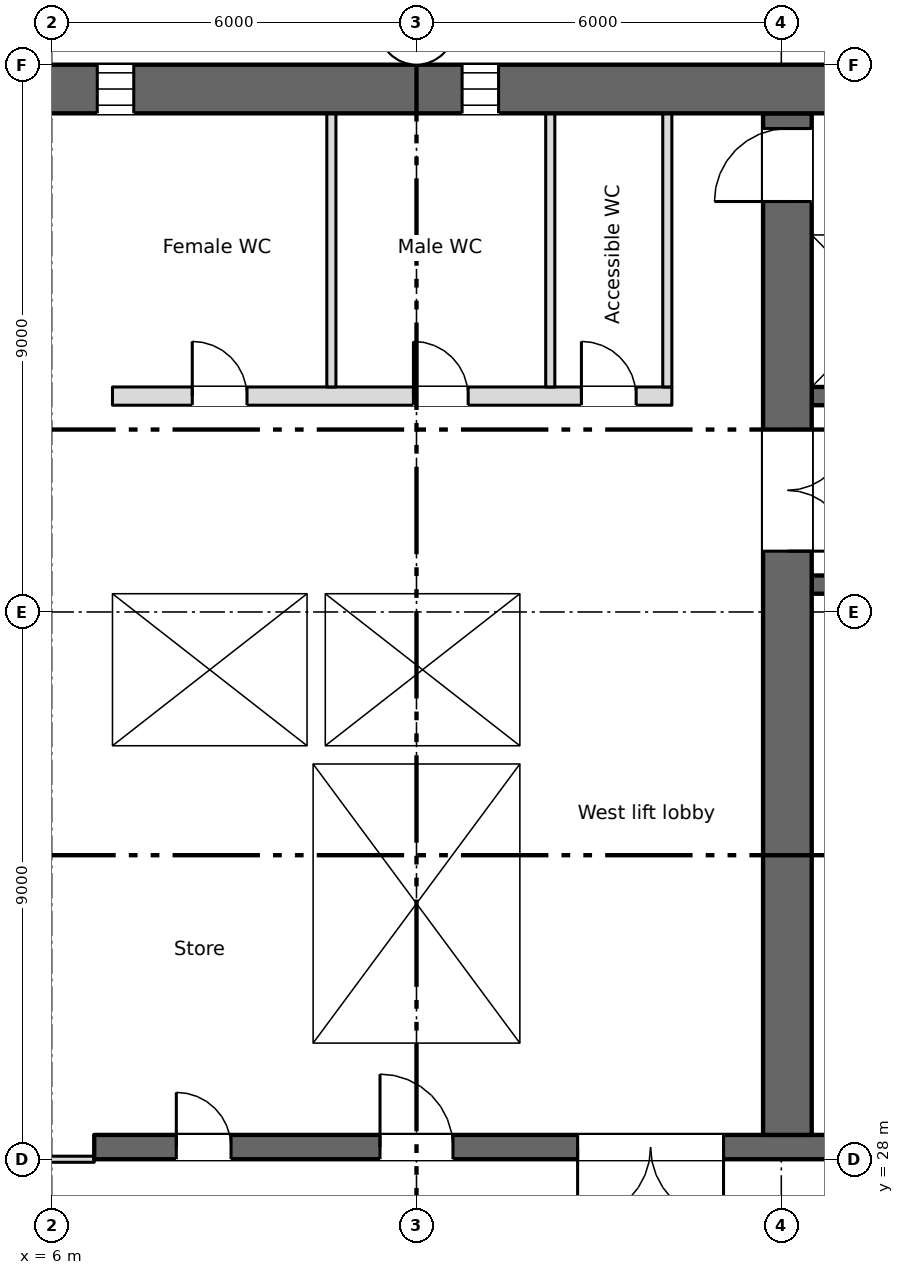
"""IFC4 building model, lengths in metres.
Left out: names, types, materials, properties, quantities, classifications, styles, units other than length and angle.
Written with IfcOpenShell. Run it as: python <this file> out.ifc"""

import sys

from ifc_helpers import new_model, si_unit, direction, frame, frame_2d, origin, place, context, subcontext, project, spatial, rectangle, extrude, element, fill, save


model = new_model("IFC4")
c1 = context("Model", 3, precision=1e-05, world=origin(), true_north=direction((0.0, 1.0)))
c2 = subcontext(c1, "Body", "Model", "MODEL_VIEW")
j1 = project(units=[si_unit("LENGTHUNIT", "METRE"), si_unit("PLANEANGLEUNIT", "RADIAN")], contexts=[c1])
p1 = place(None, origin())
s1 = spatial("IfcSite", under=j1, at=p1, CompositionType="ELEMENT")
p2 = place(p1, origin())
s2 = spatial("IfcBuilding", under=s1, at=p2, CompositionType="ELEMENT")
p3 = place(p2, frame((0.0, 0.0, 98.75)))
s3 = spatial("IfcBuildingStorey", under=s2, at=p3, CompositionType="ELEMENT", Elevation=98.75)
p4 = place(p3, frame((5.55, 45.6, 0.0), z_axis=(0.0, 0.0, 1.0), x_axis=(1.0, 0.0, 0.0)))
e1 = element("IfcWall", 1, at=p4, inside=s3, PredefinedType="SHEAR", context=c2, shape_type="SweptSolid", body=[
    extrude(rectangle(XDim=60.9, YDim=0.8, at=frame_2d((30.45, 0.0))), origin(), (0.0, 0.0, 1.0), 3.35),
])
p5 = place(p4, frame((1.2, 0.0, 0.6)))
e2 = element("IfcOpeningElement", 2, at=p5, cuts=e1, PredefinedType="OPENING", context=c2, shape_type="SweptSolid", body=[
    extrude(rectangle(XDim=0.6, YDim=2.4, at=frame_2d((0.3, 1.2))), frame((0.0, 0.41, 0.0), z_axis=(0.0, -1.0, 0.0), x_axis=(1.0, 0.0, 0.0)), (0.0, 0.0, 1.0), 0.82),
])
p6 = place(p4, frame((7.2, 0.0, 0.6)))
e3 = element("IfcOpeningElement", 3, at=p6, cuts=e1, PredefinedType="OPENING", context=c2, shape_type="SweptSolid", body=[
    extrude(rectangle(XDim=0.6, YDim=2.4, at=frame_2d((0.3, 1.2))), frame((0.0, 0.41, 0.0), z_axis=(0.0, -1.0, 0.0), x_axis=(1.0, 0.0, 0.0)), (0.0, 0.0, 1.0), 0.82),
])
p7 = place(p3, frame((6.7, 28.2, 0.0), z_axis=(0.0, 0.0, 1.0), x_axis=(1.0, 0.0, 0.0)))
e4 = element("IfcWall", 4, at=p7, inside=s3, PredefinedType="SHEAR", context=c2, shape_type="SweptSolid", body=[
    extrude(rectangle(XDim=57.8, YDim=0.4, at=frame_2d((28.9, 0.0))), origin(), (0.0, 0.0, 1.0), 3.35),
])
p8 = place(p7, frame((13.85, 0.0, 0.0)))
e5 = element("IfcOpeningElement", 5, at=p8, cuts=e4, PredefinedType="OPENING", context=c2, shape_type="SweptSolid", body=[
    extrude(rectangle(XDim=0.9, YDim=2.1, at=frame_2d((0.45, 1.05))), frame((0.0, 0.21, 0.0), z_axis=(0.0, -1.0, 0.0), x_axis=(1.0, 0.0, 0.0)), (0.0, 0.0, 1.0), 0.42),
])
p9 = place(p7, frame((48.562, 0.0, 0.0)))
e6 = element("IfcOpeningElement", 6, at=p9, cuts=e4, PredefinedType="OPENING", context=c2, shape_type="SweptSolid", body=[
    extrude(rectangle(XDim=0.9, YDim=2.1, at=frame_2d((0.45, 1.05))), frame((0.0, 0.21, 0.0), z_axis=(0.0, -1.0, 0.0), x_axis=(1.0, 0.0, 0.0)), (0.0, 0.0, 1.0), 0.42),
])
p10 = place(p7, frame((51.137, 0.0, 0.0)))
e7 = element("IfcOpeningElement", 7, at=p10, cuts=e4, PredefinedType="OPENING", context=c2, shape_type="SweptSolid", body=[
    extrude(rectangle(XDim=0.9, YDim=2.1, at=frame_2d((0.45, 1.05))), frame((0.0, 0.21, 0.0), z_axis=(0.0, -1.0, 0.0), x_axis=(1.0, 0.0, 0.0)), (0.0, 0.0, 1.0), 0.42),
])
p11 = place(p7, frame((1.35, 0.0, 0.0)))
e8 = element("IfcOpeningElement", 8, at=p11, cuts=e4, PredefinedType="OPENING", context=c2, shape_type="SweptSolid", body=[
    extrude(rectangle(XDim=0.9, YDim=2.1, at=frame_2d((0.45, 1.05))), frame((0.0, 0.21, 0.0), z_axis=(0.0, -1.0, 0.0), x_axis=(1.0, 0.0, 0.0)), (0.0, 0.0, 1.0), 0.42),
])
p12 = place(p7, frame((4.7, 0.0, 0.0)))
e9 = element("IfcOpeningElement", 9, at=p12, cuts=e4, PredefinedType="OPENING", context=c2, shape_type="SweptSolid", body=[
    extrude(rectangle(XDim=1.2, YDim=2.1, at=frame_2d((0.6, 1.05))), frame((0.0, 0.21, 0.0), z_axis=(0.0, -1.0, 0.0), x_axis=(1.0, 0.0, 0.0)), (0.0, 0.0, 1.0), 0.42),
])
p13 = place(p7, frame((31.7, 0.0, 0.0)))
e10 = element("IfcOpeningElement", 10, at=p13, cuts=e4, PredefinedType="OPENING", context=c2, shape_type="SweptSolid", body=[
    extrude(rectangle(XDim=1.2, YDim=2.1, at=frame_2d((0.6, 1.05))), frame((0.0, 0.21, 0.0), z_axis=(0.0, -1.0, 0.0), x_axis=(1.0, 0.0, 0.0)), (0.0, 0.0, 1.0), 0.42),
])
p14 = place(p7, frame((55.2, 0.0, 0.0)))
e11 = element("IfcOpeningElement", 11, at=p14, cuts=e4, PredefinedType="OPENING", context=c2, shape_type="SweptSolid", body=[
    extrude(rectangle(XDim=1.2, YDim=2.1, at=frame_2d((0.6, 1.05))), frame((0.0, 0.21, 0.0), z_axis=(0.0, -1.0, 0.0), x_axis=(1.0, 0.0, 0.0)), (0.0, 0.0, 1.0), 0.42),
])
p15 = place(p7, frame((21.7, 0.0, 0.0)))
e12 = element("IfcOpeningElement", 12, at=p15, cuts=e4, PredefinedType="OPENING", context=c2, shape_type="SweptSolid", body=[
    extrude(rectangle(XDim=1.2, YDim=2.1, at=frame_2d((0.6, 1.05))), frame((0.0, 0.21, 0.0), z_axis=(0.0, -1.0, 0.0), x_axis=(1.0, 0.0, 0.0)), (0.0, 0.0, 1.0), 0.42),
])
p16 = place(p7, frame((41.7, 0.0, 0.0)))
e13 = element("IfcOpeningElement", 13, at=p16, cuts=e4, PredefinedType="OPENING", context=c2, shape_type="SweptSolid", body=[
    extrude(rectangle(XDim=1.2, YDim=2.1, at=frame_2d((0.6, 1.05))), frame((0.0, 0.21, 0.0), z_axis=(0.0, -1.0, 0.0), x_axis=(1.0, 0.0, 0.0)), (0.0, 0.0, 1.0), 0.42),
])
p17 = place(p7, frame((24.85, 0.0, 0.0)))
e14 = element("IfcOpeningElement", 14, at=p17, cuts=e4, PredefinedType="OPENING", context=c2, shape_type="SweptSolid", body=[
    extrude(rectangle(XDim=2.4, YDim=2.1, at=frame_2d((1.2, 1.05))), frame((0.0, 0.21, 0.0), z_axis=(0.0, -1.0, 0.0), x_axis=(1.0, 0.0, 0.0)), (0.0, 0.0, 1.0), 0.42),
])
p18 = place(p7, frame((37.35, 0.0, 0.0)))
e15 = element("IfcOpeningElement", 15, at=p18, cuts=e4, PredefinedType="OPENING", context=c2, shape_type="SweptSolid", body=[
    extrude(rectangle(XDim=2.4, YDim=2.1, at=frame_2d((1.2, 1.05))), frame((0.0, 0.21, 0.0), z_axis=(0.0, -1.0, 0.0), x_axis=(1.0, 0.0, 0.0)), (0.0, 0.0, 1.0), 0.42),
])
p19 = place(p7, frame((7.95, 0.0, 0.0)))
e16 = element("IfcOpeningElement", 16, at=p19, cuts=e4, PredefinedType="OPENING", context=c2, shape_type="SweptSolid", body=[
    extrude(rectangle(XDim=2.4, YDim=2.1, at=frame_2d((1.2, 1.05))), frame((0.0, 0.21, 0.0), z_axis=(0.0, -1.0, 0.0), x_axis=(1.0, 0.0, 0.0)), (0.0, 0.0, 1.0), 0.42),
])
p20 = place(p7, frame((28.85, 0.0, 0.0)))
e17 = element("IfcOpeningElement", 17, at=p20, cuts=e4, PredefinedType="OPENING", context=c2, shape_type="SweptSolid", body=[
    extrude(rectangle(XDim=0.9, YDim=2.1, at=frame_2d((0.45, 1.05))), frame((0.0, 0.21, 0.0), z_axis=(0.0, -1.0, 0.0), x_axis=(1.0, 0.0, 0.0)), (0.0, 0.0, 1.0), 0.42),
])
p21 = place(p7, frame((34.85, 0.0, 0.0)))
e18 = element("IfcOpeningElement", 18, at=p21, cuts=e4, PredefinedType="OPENING", context=c2, shape_type="SweptSolid", body=[
    extrude(rectangle(XDim=0.9, YDim=2.1, at=frame_2d((0.45, 1.05))), frame((0.0, 0.21, 0.0), z_axis=(0.0, -1.0, 0.0), x_axis=(1.0, 0.0, 0.0)), (0.0, 0.0, 1.0), 0.42),
])
p22 = place(p3, frame((6.85, 28.4, 0.0), z_axis=(0.0, 0.0, 1.0), x_axis=(0.0, 1.0, 0.0)))
e19 = element("IfcWall", 19, at=p22, inside=s3, PredefinedType="SHEAR", context=c2, shape_type="SweptSolid", body=[
    extrude(rectangle(XDim=16.8, YDim=0.3, at=frame_2d((8.4, 0.0))), origin(), (0.0, 0.0, 1.0), 3.35),
])
p23 = place(p3, frame((18.1, 28.4, 0.0), z_axis=(0.0, 0.0, 1.0), x_axis=(0.0, 1.0, 0.0)))
e20 = element("IfcWall", 20, at=p23, inside=s3, PredefinedType="SHEAR", context=c2, shape_type="SweptSolid", body=[
    extrude(rectangle(XDim=16.8, YDim=0.8, at=frame_2d((8.4, 0.0))), origin(), (0.0, 0.0, 1.0), 3.35),
])
p24 = place(p23, frame((9.6, 0.0, 0.0)))
e21 = element("IfcOpeningElement", 21, at=p24, cuts=e20, PredefinedType="OPENING", context=c2, shape_type="SweptSolid", body=[
    extrude(rectangle(XDim=2.0, YDim=2.1, at=frame_2d((1.0, 1.05))), frame((0.0, 0.41, 0.0), z_axis=(0.0, -1.0, 0.0), x_axis=(1.0, 0.0, 0.0)), (0.0, 0.0, 1.0), 0.82),
])
p25 = place(p23, frame((15.35, 0.0, 0.0)))
e22 = element("IfcOpeningElement", 22, at=p25, cuts=e20, PredefinedType="OPENING", context=c2, shape_type="SweptSolid", body=[
    extrude(rectangle(XDim=1.2, YDim=2.1, at=frame_2d((0.6, 1.05))), frame((0.0, 0.41, 0.0), z_axis=(0.0, -1.0, 0.0), x_axis=(1.0, 0.0, 0.0)), (0.0, 0.0, 1.0), 0.82),
])
for number, where, z_axis, x_axis in (
    (23, (10.15, 28.4, 0.0), (0.0, 0.0, 1.0), (0.0, 1.0, 0.0)),
    (24, (13.85, 28.4, 0.0), (0.0, 0.0, 1.0), (0.0, 1.0, 0.0)),
):
    element("IfcWall", number, at=place(p3, frame(where, z_axis=z_axis, x_axis=x_axis)), inside=s3, PredefinedType="SHEAR", context=c2, shape_type="SweptSolid", body=[
        extrude(rectangle(XDim=6.1, YDim=0.3, at=frame_2d((3.05, 0.0))), origin(), (0.0, 0.0, 1.0), 3.35),
    ])
p26 = place(p3, frame((7.0, 34.65, 0.0), z_axis=(0.0, 0.0, 1.0), x_axis=(1.0, 0.0, 0.0)))
e25 = element("IfcWall", 25, at=p26, inside=s3, PredefinedType="SHEAR", context=c2, shape_type="SweptSolid", body=[
    extrude(rectangle(XDim=7.0, YDim=0.3, at=frame_2d((3.5, 0.0))), origin(), (0.0, 0.0, 1.0), 3.35),
])
p27 = place(p3, frame((18.5, 34.65, 0.0), z_axis=(0.0, 0.0, 1.0), x_axis=(1.0, 0.0, 0.0)))
e26 = element("IfcWall", 26, at=p27, inside=s3, PredefinedType="SHEAR", context=c2, shape_type="SweptSolid", body=[
    extrude(rectangle(XDim=12.2, YDim=0.3, at=frame_2d((6.1, 0.0))), origin(), (0.0, 0.0, 1.0), 3.35),
])
p28 = place(p27, frame((9.8, 0.0, 0.0)))
e27 = element("IfcOpeningElement", 27, at=p28, cuts=e26, PredefinedType="OPENING", context=c2, shape_type="SweptSolid", body=[
    extrude(rectangle(XDim=1.1, YDim=2.1, at=frame_2d((0.55, 1.05))), frame((0.0, 0.16, 0.0), z_axis=(0.0, -1.0, 0.0), x_axis=(1.0, 0.0, 0.0)), (0.0, 0.0, 1.0), 0.32),
])
p29 = place(p3, frame((7.0, 37.45, 0.0), z_axis=(0.0, 0.0, 1.0), x_axis=(1.0, 0.0, 0.0)))
e28 = element("IfcWall", 28, at=p29, inside=s3, PredefinedType="SHEAR", context=c2, shape_type="SweptSolid", body=[
    extrude(rectangle(XDim=7.0, YDim=0.3, at=frame_2d((3.5, 0.0))), origin(), (0.0, 0.0, 1.0), 3.35),
])
p30 = place(p3, frame((30.7, 37.45, 0.0), z_axis=(0.0, 0.0, 1.0), x_axis=(-1.0, 0.0, 0.0)))
e29 = element("IfcWall", 29, at=p30, inside=s3, PredefinedType="SHEAR", context=c2, shape_type="SweptSolid", body=[
    extrude(rectangle(XDim=12.2, YDim=0.3, at=frame_2d((6.1, 0.0))), origin(), (0.0, 0.0, 1.0), 3.35),
])
p31 = place(p30, frame((7.4, 0.0, 0.0)))
e30 = element("IfcOpeningElement", 30, at=p31, cuts=e29, PredefinedType="OPENING", context=c2, shape_type="SweptSolid", body=[
    extrude(rectangle(XDim=0.9, YDim=2.1, at=frame_2d((0.45, 1.05))), frame((0.0, 0.16, 0.0), z_axis=(0.0, -1.0, 0.0), x_axis=(1.0, 0.0, 0.0)), (0.0, 0.0, 1.0), 0.32),
])
p32 = place(p3, frame((13.85, 34.8, 0.0), z_axis=(0.0, 0.0, 1.0), x_axis=(0.0, 1.0, 0.0)))
e31 = element("IfcWall", 31, at=p32, inside=s3, PredefinedType="SHEAR", context=c2, shape_type="SweptSolid", body=[
    extrude(rectangle(XDim=2.5, YDim=0.3, at=frame_2d((1.25, 0.0))), origin(), (0.0, 0.0, 1.0), 3.35),
])
p33 = place(p3, frame((18.5, 40.55, 0.0), z_axis=(0.0, 0.0, 1.0), x_axis=(1.0, 0.0, 0.0)))
e32 = element("IfcWall", 32, at=p33, inside=s3, PredefinedType="SHEAR", context=c2, shape_type="SweptSolid", body=[
    extrude(rectangle(XDim=41.0, YDim=0.3, at=frame_2d((20.5, 0.0))), origin(), (0.0, 0.0, 1.0), 3.35),
])
p34 = place(p33, frame((18.65, 0.0, 0.0)))
e33 = element("IfcOpeningElement", 33, at=p34, cuts=e32, PredefinedType="OPENING", context=c2, shape_type="SweptSolid", body=[
    extrude(rectangle(XDim=0.9, YDim=2.1, at=frame_2d((0.45, 1.05))), frame((0.0, 0.16, 0.0), z_axis=(0.0, -1.0, 0.0), x_axis=(1.0, 0.0, 0.0)), (0.0, 0.0, 1.0), 0.32),
])
p35 = place(p33, frame((6.175, 0.0, 0.0)))
e34 = element("IfcOpeningElement", 34, at=p35, cuts=e32, PredefinedType="OPENING", context=c2, shape_type="SweptSolid", body=[
    extrude(rectangle(XDim=1.1, YDim=2.1, at=frame_2d((0.55, 1.05))), frame((0.0, 0.16, 0.0), z_axis=(0.0, -1.0, 0.0), x_axis=(1.0, 0.0, 0.0)), (0.0, 0.0, 1.0), 0.32),
])
p36 = place(p33, frame((8.925, 0.0, 0.0)))
e35 = element("IfcOpeningElement", 35, at=p36, cuts=e32, PredefinedType="OPENING", context=c2, shape_type="SweptSolid", body=[
    extrude(rectangle(XDim=1.1, YDim=2.1, at=frame_2d((0.55, 1.05))), frame((0.0, 0.16, 0.0), z_axis=(0.0, -1.0, 0.0), x_axis=(1.0, 0.0, 0.0)), (0.0, 0.0, 1.0), 0.32),
])
p37 = place(p33, frame((11.675, 0.0, 0.0)))
e36 = element("IfcOpeningElement", 36, at=p37, cuts=e32, PredefinedType="OPENING", context=c2, shape_type="SweptSolid", body=[
    extrude(rectangle(XDim=1.1, YDim=2.1, at=frame_2d((0.55, 1.05))), frame((0.0, 0.16, 0.0), z_axis=(0.0, -1.0, 0.0), x_axis=(1.0, 0.0, 0.0)), (0.0, 0.0, 1.0), 0.32),
])
p38 = place(p33, frame((30.925, 0.0, 0.0)))
e37 = element("IfcOpeningElement", 37, at=p38, cuts=e32, PredefinedType="OPENING", context=c2, shape_type="SweptSolid", body=[
    extrude(rectangle(XDim=1.1, YDim=2.1, at=frame_2d((0.55, 1.05))), frame((0.0, 0.16, 0.0), z_axis=(0.0, -1.0, 0.0), x_axis=(1.0, 0.0, 0.0)), (0.0, 0.0, 1.0), 0.32),
])
p39 = place(p33, frame((33.675, 0.0, 0.0)))
e38 = element("IfcOpeningElement", 38, at=p39, cuts=e32, PredefinedType="OPENING", context=c2, shape_type="SweptSolid", body=[
    extrude(rectangle(XDim=1.1, YDim=2.1, at=frame_2d((0.55, 1.05))), frame((0.0, 0.16, 0.0), z_axis=(0.0, -1.0, 0.0), x_axis=(1.0, 0.0, 0.0)), (0.0, 0.0, 1.0), 0.32),
])
p40 = place(p33, frame((36.375, 0.0, 0.0)))
e39 = element("IfcOpeningElement", 39, at=p40, cuts=e32, PredefinedType="OPENING", context=c2, shape_type="SweptSolid", body=[
    extrude(rectangle(XDim=1.2, YDim=2.1, at=frame_2d((0.6, 1.05))), frame((0.0, 0.16, 0.0), z_axis=(0.0, -1.0, 0.0), x_axis=(1.0, 0.0, 0.0)), (0.0, 0.0, 1.0), 0.32),
])
p41 = place(p33, frame((39.15, 0.0, 0.0)))
e40 = element("IfcOpeningElement", 40, at=p41, cuts=e32, PredefinedType="OPENING", context=c2, shape_type="SweptSolid", body=[
    extrude(rectangle(XDim=1.2, YDim=2.1, at=frame_2d((0.6, 1.05))), frame((0.0, 0.16, 0.0), z_axis=(0.0, -1.0, 0.0), x_axis=(1.0, 0.0, 0.0)), (0.0, 0.0, 1.0), 0.32),
])
p42 = place(p3, frame((18.5, 43.35, 0.0), z_axis=(0.0, 0.0, 1.0), x_axis=(1.0, 0.0, 0.0)))
e41 = element("IfcWall", 41, at=p42, inside=s3, PredefinedType="SHEAR", context=c2, shape_type="SweptSolid", body=[
    extrude(rectangle(XDim=41.0, YDim=0.3, at=frame_2d((20.5, 0.0))), origin(), (0.0, 0.0, 1.0), 3.35),
])
p43 = place(p3, frame((7.0, 40.55, 0.0), z_axis=(0.0, 0.0, 1.0), x_axis=(1.0, 0.0, 0.0)))
e42 = element("IfcWall", 42, at=p43, inside=s3, PredefinedType="PARTITIONING", context=c2, shape_type="SweptSolid", body=[
    extrude(rectangle(XDim=9.2, YDim=0.3, at=frame_2d((4.6, 0.0))), origin(), (0.0, 0.0, 1.0), 3.35),
])
p44 = place(p43, frame((1.312, 0.0, 0.0)))
e43 = element("IfcOpeningElement", 43, at=p44, cuts=e42, PredefinedType="OPENING", context=c2, shape_type="SweptSolid", body=[
    extrude(rectangle(XDim=0.9, YDim=2.1, at=frame_2d((0.45, 1.05))), frame((0.0, 0.16, 0.0), z_axis=(0.0, -1.0, 0.0), x_axis=(1.0, 0.0, 0.0)), (0.0, 0.0, 1.0), 0.32),
])
p45 = place(p43, frame((4.95, 0.0, 0.0)))
e44 = element("IfcOpeningElement", 44, at=p45, cuts=e42, PredefinedType="OPENING", context=c2, shape_type="SweptSolid", body=[
    extrude(rectangle(XDim=0.9, YDim=2.1, at=frame_2d((0.45, 1.05))), frame((0.0, 0.16, 0.0), z_axis=(0.0, -1.0, 0.0), x_axis=(1.0, 0.0, 0.0)), (0.0, 0.0, 1.0), 0.32),
])
p46 = place(p43, frame((7.712, 0.0, 0.0)))
e45 = element("IfcOpeningElement", 45, at=p46, cuts=e42, PredefinedType="OPENING", context=c2, shape_type="SweptSolid", body=[
    extrude(rectangle(XDim=0.9, YDim=2.1, at=frame_2d((0.45, 1.05))), frame((0.0, 0.16, 0.0), z_axis=(0.0, -1.0, 0.0), x_axis=(1.0, 0.0, 0.0)), (0.0, 0.0, 1.0), 0.32),
])
p47 = place(p3, frame((10.35, 34.8, 0.0), z_axis=(0.0, 0.0, 1.0), x_axis=(0.0, 1.0, 0.0)))
e46 = element("IfcWall", 46, at=p47, inside=s3, PredefinedType="SHEAR", context=c2, shape_type="SweptSolid", body=[
    extrude(rectangle(XDim=2.5, YDim=0.3, at=frame_2d((1.25, 0.0))), origin(), (0.0, 0.0, 1.0), 3.35),
])
for number, where, z_axis, x_axis in (
    (47, (16.125, 40.7, 0.0), (0.0, 0.0, 1.0), (0.0, 1.0, 0.0)),
    (48, (10.6, 40.7, 0.0), (0.0, 0.0, 1.0), (0.0, 1.0, 0.0)),
    (49, (14.2, 40.7, 0.0), (0.0, 0.0, 1.0), (0.0, 1.0, 0.0)),
):
    element("IfcWall", number, at=place(p3, frame(where, z_axis=z_axis, x_axis=x_axis)), inside=s3, PredefinedType="PARTITIONING", context=c2, shape_type="SweptSolid", body=[
        extrude(rectangle(XDim=4.5, YDim=0.15, at=frame_2d((2.25, 0.0))), origin(), (0.0, 0.0, 1.0), 3.35),
    ])
p48 = place(p3, frame((0.7, 28.0, 0.0), z_axis=(0.0, 0.0, 1.0), x_axis=(1.0, 0.0, 0.0)))
e50 = element("IfcWall", 50, at=p48, inside=s3, PredefinedType="PARTITIONING", context=c2, shape_type="SweptSolid", body=[
    extrude(rectangle(XDim=6.0, YDim=0.1, at=frame_2d((3.0, 0.0))), origin(), (0.0, 0.0, 1.0), 3.35),
])
p49 = place(p48, frame((2.1, 0.0, 0.0)))
e51 = element("IfcOpeningElement", 51, at=p49, cuts=e50, PredefinedType="OPENING", context=c2, shape_type="SweptSolid", body=[
    extrude(rectangle(XDim=1.8, YDim=2.1, at=frame_2d((0.9, 1.05))), frame((0.0, 0.06, 0.0), z_axis=(0.0, -1.0, 0.0), x_axis=(1.0, 0.0, 0.0)), (0.0, 0.0, 1.0), 0.12),
])
p50 = place(p5, origin())
e52 = element("IfcWindow", 52, at=p50, inside=s3, PartitioningType="SINGLE_PANEL", PredefinedType="WINDOW", context=c2, shape_type="SweptSolid", body=[
    extrude(rectangle(XDim=0.6, YDim=2.4, at=frame_2d((0.3, 1.2))), frame((0.0, 0.03, 0.0), z_axis=(0.0, -1.0, 0.0), x_axis=(1.0, 0.0, 0.0)), (0.0, 0.0, 1.0), 0.06),
])
fill(e2, e52)
p51 = place(p6, origin())
e53 = element("IfcWindow", 53, at=p51, inside=s3, PartitioningType="SINGLE_PANEL", PredefinedType="WINDOW", context=c2, shape_type="SweptSolid", body=[
    extrude(rectangle(XDim=0.6, YDim=2.4, at=frame_2d((0.3, 1.2))), frame((0.0, 0.03, 0.0), z_axis=(0.0, -1.0, 0.0), x_axis=(1.0, 0.0, 0.0)), (0.0, 0.0, 1.0), 0.06),
])
fill(e3, e53)
p52 = place(p11, origin())
e54 = element("IfcDoor", 54, at=p52, inside=s3, OperationType="SINGLE_SWING_LEFT", PredefinedType="DOOR", context=c2, shape_type="SweptSolid", body=[
    extrude(rectangle(XDim=0.9, YDim=2.1, at=frame_2d((0.45, 1.05))), frame((0.0, 0.025, 0.0), z_axis=(0.0, -1.0, 0.0), x_axis=(1.0, 0.0, 0.0)), (0.0, 0.0, 1.0), 0.05),
])
fill(e8, e54)
p53 = place(p44, origin())
e55 = element("IfcDoor", 55, at=p53, inside=s3, OperationType="SINGLE_SWING_LEFT", PredefinedType="DOOR", context=c2, shape_type="SweptSolid", body=[
    extrude(rectangle(XDim=0.9, YDim=2.1, at=frame_2d((0.45, 1.05))), frame((0.0, 0.025, 0.0), z_axis=(0.0, -1.0, 0.0), x_axis=(1.0, 0.0, 0.0)), (0.0, 0.0, 1.0), 0.05),
])
fill(e43, e55)
p54 = place(p45, origin())
e56 = element("IfcDoor", 56, at=p54, inside=s3, OperationType="SINGLE_SWING_LEFT", PredefinedType="DOOR", context=c2, shape_type="SweptSolid", body=[
    extrude(rectangle(XDim=0.9, YDim=2.1, at=frame_2d((0.45, 1.05))), frame((0.0, 0.025, 0.0), z_axis=(0.0, -1.0, 0.0), x_axis=(1.0, 0.0, 0.0)), (0.0, 0.0, 1.0), 0.05),
])
fill(e44, e56)
p55 = place(p46, origin())
e57 = element("IfcDoor", 57, at=p55, inside=s3, OperationType="SINGLE_SWING_LEFT", PredefinedType="DOOR", context=c2, shape_type="SweptSolid", body=[
    extrude(rectangle(XDim=0.9, YDim=2.1, at=frame_2d((0.45, 1.05))), frame((0.0, 0.025, 0.0), z_axis=(0.0, -1.0, 0.0), x_axis=(1.0, 0.0, 0.0)), (0.0, 0.0, 1.0), 0.05),
])
fill(e45, e57)
p56 = place(p12, origin())
e58 = element("IfcDoor", 58, at=p56, inside=s3, OperationType="SINGLE_SWING_LEFT", PredefinedType="DOOR", context=c2, shape_type="SweptSolid", body=[
    extrude(rectangle(XDim=1.2, YDim=2.1, at=frame_2d((0.6, 1.05))), frame((0.0, 0.025, 0.0), z_axis=(0.0, -1.0, 0.0), x_axis=(1.0, 0.0, 0.0)), (0.0, 0.0, 1.0), 0.05),
])
fill(e9, e58)
p57 = place(p19, origin())
e59 = element("IfcDoor", 59, at=p57, inside=s3, OperationType="DOUBLE_DOOR_SINGLE_SWING", PredefinedType="DOOR", context=c2, shape_type="SweptSolid", body=[
    extrude(rectangle(XDim=2.4, YDim=2.1, at=frame_2d((1.2, 1.05))), frame((0.0, 0.025, 0.0), z_axis=(0.0, -1.0, 0.0), x_axis=(1.0, 0.0, 0.0)), (0.0, 0.0, 1.0), 0.05),
])
fill(e16, e59)
p58 = place(p24, origin())
e60 = element("IfcDoor", 60, at=p58, inside=s3, OperationType="DOUBLE_DOOR_SINGLE_SWING", PredefinedType="DOOR", context=c2, shape_type="SweptSolid", body=[
    extrude(rectangle(XDim=2.0, YDim=2.1, at=frame_2d((1.0, 1.05))), frame((0.0, 0.025, 0.0), z_axis=(0.0, -1.0, 0.0), x_axis=(1.0, 0.0, 0.0)), (0.0, 0.0, 1.0), 0.05),
])
fill(e21, e60)
p59 = place(p25, origin())
e61 = element("IfcDoor", 61, at=p59, inside=s3, OperationType="SINGLE_SWING_LEFT", PredefinedType="DOOR", context=c2, shape_type="SweptSolid", body=[
    extrude(rectangle(XDim=1.2, YDim=2.1, at=frame_2d((0.6, 1.05))), frame((0.0, 0.025, 0.0), z_axis=(0.0, -1.0, 0.0), x_axis=(1.0, 0.0, 0.0)), (0.0, 0.0, 1.0), 0.05),
])
fill(e22, e61)
save(model, sys.argv[1])
